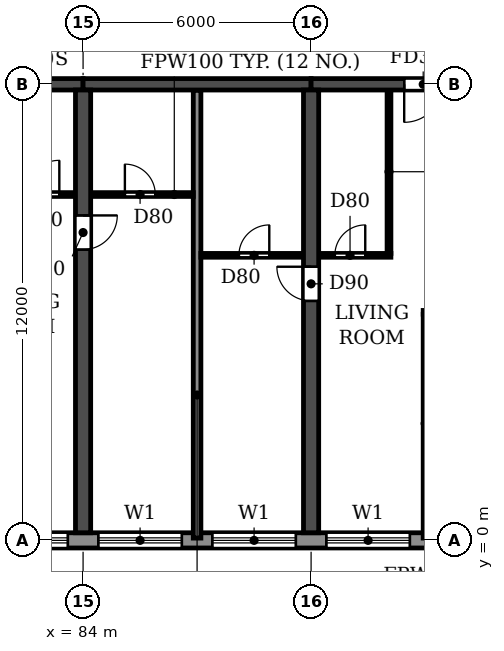
"""IFC4 building model, lengths in metres.
Left out: names, types, materials, properties, quantities, classifications, styles, units other than length and angle.
Written with IfcOpenShell. Run it as: python <this file> out.ifc"""

import sys

from ifc_helpers import new_model, si_unit, direction, frame, frame_2d, origin, place, context, subcontext, project, spatial, rectangle, extrude, element, fill, save


model = new_model("IFC4")
c1 = context("Model", 3, precision=1e-05, world=origin(), true_north=direction((0.0, 1.0)))
c2 = subcontext(c1, "Body", "Model", "MODEL_VIEW")
j1 = project(units=[si_unit("LENGTHUNIT", "METRE"), si_unit("PLANEANGLEUNIT", "RADIAN")], contexts=[c1])
p1 = place(None, origin())
s1 = spatial("IfcSite", under=j1, at=p1, CompositionType="ELEMENT")
p2 = place(p1, origin())
s2 = spatial("IfcBuilding", under=s1, at=p2, CompositionType="ELEMENT")
p3 = place(p2, frame((0.0, 0.0, 26.7)))
s3 = spatial("IfcBuildingStorey", under=s2, at=p3, CompositionType="ELEMENT", Elevation=26.7)
p4 = place(p3, frame((84.0, 0.2, 0.0), z_axis=(0.0, 0.0, 1.0), x_axis=(0.0, 1.0, 0.0)))
e1 = element("IfcWall", 1, at=p4, inside=s3, PredefinedType="SHEAR", context=c2, shape_type="SweptSolid", body=[
    extrude(rectangle(XDim=11.65, YDim=0.4, at=frame_2d((5.825, 0.0))), origin(), (0.0, 0.0, 1.0), 3.05),
])
p5 = place(p4, frame((7.45, 0.0, 0.0)))
e2 = element("IfcOpeningElement", 2, at=p5, cuts=e1, PredefinedType="OPENING", context=c2, shape_type="SweptSolid", body=[
    extrude(rectangle(XDim=0.9, YDim=2.1, at=frame_2d((0.45, 1.05))), frame((0.0, 0.21, 0.0), z_axis=(0.0, -1.0, 0.0), x_axis=(1.0, 0.0, 0.0)), (0.0, 0.0, 1.0), 0.42),
])
p6 = place(p3, frame((90.0, 0.2, 0.0), z_axis=(0.0, 0.0, 1.0), x_axis=(0.0, 1.0, 0.0)))
e3 = element("IfcWall", 3, at=p6, inside=s3, PredefinedType="SHEAR", context=c2, shape_type="SweptSolid", body=[
    extrude(rectangle(XDim=11.65, YDim=0.4, at=frame_2d((5.825, 0.0))), origin(), (0.0, 0.0, 1.0), 3.05),
])
p7 = place(p6, frame((6.1, 0.0, 0.0)))
e4 = element("IfcOpeningElement", 4, at=p7, cuts=e3, PredefinedType="OPENING", context=c2, shape_type="SweptSolid", body=[
    extrude(rectangle(XDim=0.9, YDim=2.1, at=frame_2d((0.45, 1.05))), frame((0.0, 0.21, 0.0), z_axis=(0.0, -1.0, 0.0), x_axis=(1.0, 0.0, 0.0)), (0.0, 0.0, 1.0), 0.42),
])
p8 = place(p3, frame((78.0, 12.0, 0.0), z_axis=(0.0, 0.0, 1.0), x_axis=(1.0, 0.0, 0.0)))
e5 = element("IfcWall", 5, at=p8, inside=s3, PredefinedType="SHEAR", context=c2, shape_type="SweptSolid", body=[
    extrude(rectangle(XDim=6.0, YDim=0.3, at=frame_2d((3.0, 0.0))), origin(), (0.0, 0.0, 1.0), 2.45),
])
p9 = place(p8, frame((2.45, 0.0, 0.0)))
e6 = element("IfcOpeningElement", 6, at=p9, cuts=e5, PredefinedType="OPENING", context=c2, shape_type="SweptSolid", body=[
    extrude(rectangle(XDim=1.0, YDim=2.1, at=frame_2d((0.5, 1.05))), frame((0.0, 0.16, 0.0), z_axis=(0.0, -1.0, 0.0), x_axis=(1.0, 0.0, 0.0)), (0.0, 0.0, 1.0), 0.32),
])
p10 = place(p3, frame((84.0, 12.0, 0.0), z_axis=(0.0, 0.0, 1.0), x_axis=(1.0, 0.0, 0.0)))
e7 = element("IfcWall", 7, at=p10, inside=s3, PredefinedType="SHEAR", context=c2, shape_type="SweptSolid", body=[
    extrude(rectangle(XDim=6.0, YDim=0.3, at=frame_2d((3.0, 0.0))), origin(), (0.0, 0.0, 1.0), 2.45),
])
p11 = place(p3, frame((90.0, 12.0, 0.0), z_axis=(0.0, 0.0, 1.0), x_axis=(1.0, 0.0, 0.0)))
e8 = element("IfcWall", 8, at=p11, inside=s3, PredefinedType="SHEAR", context=c2, shape_type="SweptSolid", body=[
    extrude(rectangle(XDim=6.0, YDim=0.3, at=frame_2d((3.0, 0.0))), origin(), (0.0, 0.0, 1.0), 2.45),
])
p12 = place(p11, frame((2.45, 0.0, 0.0)))
e9 = element("IfcOpeningElement", 9, at=p12, cuts=e8, PredefinedType="OPENING", context=c2, shape_type="SweptSolid", body=[
    extrude(rectangle(XDim=1.0, YDim=2.1, at=frame_2d((0.5, 1.05))), frame((0.0, 0.16, 0.0), z_axis=(0.0, -1.0, 0.0), x_axis=(1.0, 0.0, 0.0)), (0.0, 0.0, 1.0), 0.32),
])
p13 = place(p3, frame((4.683, 0.0, 0.0), z_axis=(0.0, 0.0, 1.0), x_axis=(1.0, 0.0, 0.0)))
e10 = element("IfcWall", 10, at=p13, inside=s3, PredefinedType="STANDARD", context=c2, shape_type="SweptSolid", body=[
    extrude(rectangle(XDim=92.634, YDim=0.4, at=frame_2d((46.317, 0.0))), origin(), (0.0, 0.0, 1.0), 3.05),
])
p14 = place(p13, frame((1.717, 0.0, 0.9)))
e11 = element("IfcOpeningElement", 11, at=p14, cuts=e10, PredefinedType="OPENING", context=c2, shape_type="SweptSolid", body=[
    extrude(rectangle(XDim=2.2, YDim=1.5, at=frame_2d((1.1, 0.75))), frame((0.0, 0.21, 0.0), z_axis=(0.0, -1.0, 0.0), x_axis=(1.0, 0.0, 0.0)), (0.0, 0.0, 1.0), 0.42),
])
p15 = place(p13, frame((4.717, 0.0, 0.9)))
e12 = element("IfcOpeningElement", 12, at=p15, cuts=e10, PredefinedType="OPENING", context=c2, shape_type="SweptSolid", body=[
    extrude(rectangle(XDim=2.2, YDim=1.5, at=frame_2d((1.1, 0.75))), frame((0.0, 0.21, 0.0), z_axis=(0.0, -1.0, 0.0), x_axis=(1.0, 0.0, 0.0)), (0.0, 0.0, 1.0), 0.42),
])
p16 = place(p13, frame((7.717, 0.0, 0.9)))
e13 = element("IfcOpeningElement", 13, at=p16, cuts=e10, PredefinedType="OPENING", context=c2, shape_type="SweptSolid", body=[
    extrude(rectangle(XDim=2.2, YDim=1.5, at=frame_2d((1.1, 0.75))), frame((0.0, 0.21, 0.0), z_axis=(0.0, -1.0, 0.0), x_axis=(1.0, 0.0, 0.0)), (0.0, 0.0, 1.0), 0.42),
])
p17 = place(p13, frame((10.717, 0.0, 0.9)))
e14 = element("IfcOpeningElement", 14, at=p17, cuts=e10, PredefinedType="OPENING", context=c2, shape_type="SweptSolid", body=[
    extrude(rectangle(XDim=2.2, YDim=1.5, at=frame_2d((1.1, 0.75))), frame((0.0, 0.21, 0.0), z_axis=(0.0, -1.0, 0.0), x_axis=(1.0, 0.0, 0.0)), (0.0, 0.0, 1.0), 0.42),
])
p18 = place(p13, frame((13.717, 0.0, 0.9)))
e15 = element("IfcOpeningElement", 15, at=p18, cuts=e10, PredefinedType="OPENING", context=c2, shape_type="SweptSolid", body=[
    extrude(rectangle(XDim=2.2, YDim=1.5, at=frame_2d((1.1, 0.75))), frame((0.0, 0.21, 0.0), z_axis=(0.0, -1.0, 0.0), x_axis=(1.0, 0.0, 0.0)), (0.0, 0.0, 1.0), 0.42),
])
p19 = place(p13, frame((16.717, 0.0, 0.9)))
e16 = element("IfcOpeningElement", 16, at=p19, cuts=e10, PredefinedType="OPENING", context=c2, shape_type="SweptSolid", body=[
    extrude(rectangle(XDim=2.2, YDim=1.5, at=frame_2d((1.1, 0.75))), frame((0.0, 0.21, 0.0), z_axis=(0.0, -1.0, 0.0), x_axis=(1.0, 0.0, 0.0)), (0.0, 0.0, 1.0), 0.42),
])
p20 = place(p13, frame((19.917, 0.0, 0.0)))
e17 = element("IfcOpeningElement", 17, at=p20, cuts=e10, PredefinedType="OPENING", context=c2, shape_type="SweptSolid", body=[
    extrude(rectangle(XDim=1.8, YDim=2.4, at=frame_2d((0.9, 1.2))), frame((0.0, 0.21, 0.0), z_axis=(0.0, -1.0, 0.0), x_axis=(1.0, 0.0, 0.0)), (0.0, 0.0, 1.0), 0.42),
])
p21 = place(p13, frame((22.717, 0.0, 0.9)))
e18 = element("IfcOpeningElement", 18, at=p21, cuts=e10, PredefinedType="OPENING", context=c2, shape_type="SweptSolid", body=[
    extrude(rectangle(XDim=2.2, YDim=1.5, at=frame_2d((1.1, 0.75))), frame((0.0, 0.21, 0.0), z_axis=(0.0, -1.0, 0.0), x_axis=(1.0, 0.0, 0.0)), (0.0, 0.0, 1.0), 0.42),
])
p22 = place(p13, frame((25.717, 0.0, 0.9)))
e19 = element("IfcOpeningElement", 19, at=p22, cuts=e10, PredefinedType="OPENING", context=c2, shape_type="SweptSolid", body=[
    extrude(rectangle(XDim=2.2, YDim=1.5, at=frame_2d((1.1, 0.75))), frame((0.0, 0.21, 0.0), z_axis=(0.0, -1.0, 0.0), x_axis=(1.0, 0.0, 0.0)), (0.0, 0.0, 1.0), 0.42),
])
p23 = place(p13, frame((28.717, 0.0, 0.9)))
e20 = element("IfcOpeningElement", 20, at=p23, cuts=e10, PredefinedType="OPENING", context=c2, shape_type="SweptSolid", body=[
    extrude(rectangle(XDim=2.2, YDim=1.5, at=frame_2d((1.1, 0.75))), frame((0.0, 0.21, 0.0), z_axis=(0.0, -1.0, 0.0), x_axis=(1.0, 0.0, 0.0)), (0.0, 0.0, 1.0), 0.42),
])
p24 = place(p13, frame((31.917, 0.0, 0.0)))
e21 = element("IfcOpeningElement", 21, at=p24, cuts=e10, PredefinedType="OPENING", context=c2, shape_type="SweptSolid", body=[
    extrude(rectangle(XDim=1.8, YDim=2.4, at=frame_2d((0.9, 1.2))), frame((0.0, 0.21, 0.0), z_axis=(0.0, -1.0, 0.0), x_axis=(1.0, 0.0, 0.0)), (0.0, 0.0, 1.0), 0.42),
])
p25 = place(p13, frame((34.717, 0.0, 0.9)))
e22 = element("IfcOpeningElement", 22, at=p25, cuts=e10, PredefinedType="OPENING", context=c2, shape_type="SweptSolid", body=[
    extrude(rectangle(XDim=2.2, YDim=1.5, at=frame_2d((1.1, 0.75))), frame((0.0, 0.21, 0.0), z_axis=(0.0, -1.0, 0.0), x_axis=(1.0, 0.0, 0.0)), (0.0, 0.0, 1.0), 0.42),
])
p26 = place(p13, frame((37.717, 0.0, 0.9)))
e23 = element("IfcOpeningElement", 23, at=p26, cuts=e10, PredefinedType="OPENING", context=c2, shape_type="SweptSolid", body=[
    extrude(rectangle(XDim=2.2, YDim=1.5, at=frame_2d((1.1, 0.75))), frame((0.0, 0.21, 0.0), z_axis=(0.0, -1.0, 0.0), x_axis=(1.0, 0.0, 0.0)), (0.0, 0.0, 1.0), 0.42),
])
p27 = place(p13, frame((40.717, 0.0, 0.9)))
e24 = element("IfcOpeningElement", 24, at=p27, cuts=e10, PredefinedType="OPENING", context=c2, shape_type="SweptSolid", body=[
    extrude(rectangle(XDim=2.2, YDim=1.5, at=frame_2d((1.1, 0.75))), frame((0.0, 0.21, 0.0), z_axis=(0.0, -1.0, 0.0), x_axis=(1.0, 0.0, 0.0)), (0.0, 0.0, 1.0), 0.42),
])
p28 = place(p13, frame((43.917, 0.0, 0.0)))
e25 = element("IfcOpeningElement", 25, at=p28, cuts=e10, PredefinedType="OPENING", context=c2, shape_type="SweptSolid", body=[
    extrude(rectangle(XDim=1.8, YDim=2.4, at=frame_2d((0.9, 1.2))), frame((0.0, 0.21, 0.0), z_axis=(0.0, -1.0, 0.0), x_axis=(1.0, 0.0, 0.0)), (0.0, 0.0, 1.0), 0.42),
])
p29 = place(p13, frame((46.717, 0.0, 0.9)))
e26 = element("IfcOpeningElement", 26, at=p29, cuts=e10, PredefinedType="OPENING", context=c2, shape_type="SweptSolid", body=[
    extrude(rectangle(XDim=2.2, YDim=1.5, at=frame_2d((1.1, 0.75))), frame((0.0, 0.21, 0.0), z_axis=(0.0, -1.0, 0.0), x_axis=(1.0, 0.0, 0.0)), (0.0, 0.0, 1.0), 0.42),
])
p30 = place(p13, frame((49.717, 0.0, 0.9)))
e27 = element("IfcOpeningElement", 27, at=p30, cuts=e10, PredefinedType="OPENING", context=c2, shape_type="SweptSolid", body=[
    extrude(rectangle(XDim=2.2, YDim=1.5, at=frame_2d((1.1, 0.75))), frame((0.0, 0.21, 0.0), z_axis=(0.0, -1.0, 0.0), x_axis=(1.0, 0.0, 0.0)), (0.0, 0.0, 1.0), 0.42),
])
p31 = place(p13, frame((52.717, 0.0, 0.9)))
e28 = element("IfcOpeningElement", 28, at=p31, cuts=e10, PredefinedType="OPENING", context=c2, shape_type="SweptSolid", body=[
    extrude(rectangle(XDim=2.2, YDim=1.5, at=frame_2d((1.1, 0.75))), frame((0.0, 0.21, 0.0), z_axis=(0.0, -1.0, 0.0), x_axis=(1.0, 0.0, 0.0)), (0.0, 0.0, 1.0), 0.42),
])
p32 = place(p13, frame((55.717, 0.0, 0.9)))
e29 = element("IfcOpeningElement", 29, at=p32, cuts=e10, PredefinedType="OPENING", context=c2, shape_type="SweptSolid", body=[
    extrude(rectangle(XDim=2.2, YDim=1.5, at=frame_2d((1.1, 0.75))), frame((0.0, 0.21, 0.0), z_axis=(0.0, -1.0, 0.0), x_axis=(1.0, 0.0, 0.0)), (0.0, 0.0, 1.0), 0.42),
])
p33 = place(p13, frame((58.917, 0.0, 0.0)))
e30 = element("IfcOpeningElement", 30, at=p33, cuts=e10, PredefinedType="OPENING", context=c2, shape_type="SweptSolid", body=[
    extrude(rectangle(XDim=1.8, YDim=2.4, at=frame_2d((0.9, 1.2))), frame((0.0, 0.21, 0.0), z_axis=(0.0, -1.0, 0.0), x_axis=(1.0, 0.0, 0.0)), (0.0, 0.0, 1.0), 0.42),
])
p34 = place(p13, frame((61.717, 0.0, 0.9)))
e31 = element("IfcOpeningElement", 31, at=p34, cuts=e10, PredefinedType="OPENING", context=c2, shape_type="SweptSolid", body=[
    extrude(rectangle(XDim=2.2, YDim=1.5, at=frame_2d((1.1, 0.75))), frame((0.0, 0.21, 0.0), z_axis=(0.0, -1.0, 0.0), x_axis=(1.0, 0.0, 0.0)), (0.0, 0.0, 1.0), 0.42),
])
p35 = place(p13, frame((64.717, 0.0, 0.9)))
e32 = element("IfcOpeningElement", 32, at=p35, cuts=e10, PredefinedType="OPENING", context=c2, shape_type="SweptSolid", body=[
    extrude(rectangle(XDim=2.2, YDim=1.5, at=frame_2d((1.1, 0.75))), frame((0.0, 0.21, 0.0), z_axis=(0.0, -1.0, 0.0), x_axis=(1.0, 0.0, 0.0)), (0.0, 0.0, 1.0), 0.42),
])
p36 = place(p13, frame((67.717, 0.0, 0.9)))
e33 = element("IfcOpeningElement", 33, at=p36, cuts=e10, PredefinedType="OPENING", context=c2, shape_type="SweptSolid", body=[
    extrude(rectangle(XDim=2.2, YDim=1.5, at=frame_2d((1.1, 0.75))), frame((0.0, 0.21, 0.0), z_axis=(0.0, -1.0, 0.0), x_axis=(1.0, 0.0, 0.0)), (0.0, 0.0, 1.0), 0.42),
])
p37 = place(p13, frame((70.917, 0.0, 0.0)))
e34 = element("IfcOpeningElement", 34, at=p37, cuts=e10, PredefinedType="OPENING", context=c2, shape_type="SweptSolid", body=[
    extrude(rectangle(XDim=1.8, YDim=2.4, at=frame_2d((0.9, 1.2))), frame((0.0, 0.21, 0.0), z_axis=(0.0, -1.0, 0.0), x_axis=(1.0, 0.0, 0.0)), (0.0, 0.0, 1.0), 0.42),
])
p38 = place(p13, frame((73.717, 0.0, 0.9)))
e35 = element("IfcOpeningElement", 35, at=p38, cuts=e10, PredefinedType="OPENING", context=c2, shape_type="SweptSolid", body=[
    extrude(rectangle(XDim=2.2, YDim=1.5, at=frame_2d((1.1, 0.75))), frame((0.0, 0.21, 0.0), z_axis=(0.0, -1.0, 0.0), x_axis=(1.0, 0.0, 0.0)), (0.0, 0.0, 1.0), 0.42),
])
p39 = place(p13, frame((76.717, 0.0, 0.9)))
e36 = element("IfcOpeningElement", 36, at=p39, cuts=e10, PredefinedType="OPENING", context=c2, shape_type="SweptSolid", body=[
    extrude(rectangle(XDim=2.2, YDim=1.5, at=frame_2d((1.1, 0.75))), frame((0.0, 0.21, 0.0), z_axis=(0.0, -1.0, 0.0), x_axis=(1.0, 0.0, 0.0)), (0.0, 0.0, 1.0), 0.42),
])
p40 = place(p13, frame((79.717, 0.0, 0.9)))
e37 = element("IfcOpeningElement", 37, at=p40, cuts=e10, PredefinedType="OPENING", context=c2, shape_type="SweptSolid", body=[
    extrude(rectangle(XDim=2.2, YDim=1.5, at=frame_2d((1.1, 0.75))), frame((0.0, 0.21, 0.0), z_axis=(0.0, -1.0, 0.0), x_axis=(1.0, 0.0, 0.0)), (0.0, 0.0, 1.0), 0.42),
])
p41 = place(p13, frame((82.717, 0.0, 0.9)))
e38 = element("IfcOpeningElement", 38, at=p41, cuts=e10, PredefinedType="OPENING", context=c2, shape_type="SweptSolid", body=[
    extrude(rectangle(XDim=2.2, YDim=1.5, at=frame_2d((1.1, 0.75))), frame((0.0, 0.21, 0.0), z_axis=(0.0, -1.0, 0.0), x_axis=(1.0, 0.0, 0.0)), (0.0, 0.0, 1.0), 0.42),
])
p42 = place(p13, frame((85.717, 0.0, 0.9)))
e39 = element("IfcOpeningElement", 39, at=p42, cuts=e10, PredefinedType="OPENING", context=c2, shape_type="SweptSolid", body=[
    extrude(rectangle(XDim=2.2, YDim=1.5, at=frame_2d((1.1, 0.75))), frame((0.0, 0.21, 0.0), z_axis=(0.0, -1.0, 0.0), x_axis=(1.0, 0.0, 0.0)), (0.0, 0.0, 1.0), 0.42),
])
p43 = place(p13, frame((88.717, 0.0, 0.9)))
e40 = element("IfcOpeningElement", 40, at=p43, cuts=e10, PredefinedType="OPENING", context=c2, shape_type="SweptSolid", body=[
    extrude(rectangle(XDim=2.2, YDim=1.5, at=frame_2d((1.1, 0.75))), frame((0.0, 0.21, 0.0), z_axis=(0.0, -1.0, 0.0), x_axis=(1.0, 0.0, 0.0)), (0.0, 0.0, 1.0), 0.42),
])
p44 = place(p3, frame((87.0, 0.06, 0.0), z_axis=(0.0, 0.0, 1.0), x_axis=(0.0, 1.0, 0.0)))
e41 = element("IfcWall", 41, at=p44, inside=s3, PredefinedType="PARTITIONING", context=c2, shape_type="SweptSolid", body=[
    extrude(rectangle(XDim=11.78, YDim=0.2, at=frame_2d((5.89, 0.0))), origin(), (0.0, 0.0, 1.0), 3.05),
])
p45 = place(p3, frame((92.95, 6.0, 0.0), z_axis=(0.0, 0.0, 1.0), x_axis=(1.0, 0.0, 0.0)))
e42 = element("IfcWall", 42, at=p45, inside=s3, PredefinedType="PARTITIONING", context=c2, shape_type="SweptSolid", body=[
    extrude(rectangle(XDim=2.84, YDim=0.1, at=frame_2d((1.42, 0.0))), origin(), (0.0, 0.0, 1.0), 3.05),
])
p46 = place(p45, frame((0.55, 0.0, 0.0)))
e43 = element("IfcOpeningElement", 43, at=p46, cuts=e42, PredefinedType="OPENING", context=c2, shape_type="SweptSolid", body=[
    extrude(rectangle(XDim=0.9, YDim=2.1, at=frame_2d((0.45, 1.05))), frame((0.0, 0.06, 0.0), z_axis=(0.0, -1.0, 0.0), x_axis=(1.0, 0.0, 0.0)), (0.0, 0.0, 1.0), 0.12),
])
p47 = place(p3, frame((87.1, 7.5, 0.0), z_axis=(0.0, 0.0, 1.0), x_axis=(1.0, 0.0, 0.0)))
e44 = element("IfcWall", 44, at=p47, inside=s3, PredefinedType="PARTITIONING", context=c2, shape_type="SweptSolid", body=[
    extrude(rectangle(XDim=2.69, YDim=0.1, at=frame_2d((1.345, 0.0))), origin(), (0.0, 0.0, 1.0), 3.05),
])
p48 = place(p47, frame((1.0, 0.0, 0.0)))
e45 = element("IfcOpeningElement", 45, at=p48, cuts=e44, PredefinedType="OPENING", context=c2, shape_type="SweptSolid", body=[
    extrude(rectangle(XDim=0.8, YDim=2.1, at=frame_2d((0.4, 1.05))), frame((0.0, 0.06, 0.0), z_axis=(0.0, -1.0, 0.0), x_axis=(1.0, 0.0, 0.0)), (0.0, 0.0, 1.0), 0.12),
])
p49 = place(p3, frame((90.21, 7.5, 0.0), z_axis=(0.0, 0.0, 1.0), x_axis=(1.0, 0.0, 0.0)))
e46 = element("IfcWall", 46, at=p49, inside=s3, PredefinedType="PARTITIONING", context=c2, shape_type="SweptSolid", body=[
    extrude(rectangle(XDim=1.89, YDim=0.1, at=frame_2d((0.945, 0.0))), origin(), (0.0, 0.0, 1.0), 3.05),
])
p50 = place(p49, frame((0.415, 0.0, 0.0)))
e47 = element("IfcOpeningElement", 47, at=p50, cuts=e46, PredefinedType="OPENING", context=c2, shape_type="SweptSolid", body=[
    extrude(rectangle(XDim=0.8, YDim=2.1, at=frame_2d((0.4, 1.05))), frame((0.0, 0.06, 0.0), z_axis=(0.0, -1.0, 0.0), x_axis=(1.0, 0.0, 0.0)), (0.0, 0.0, 1.0), 0.12),
])
p51 = place(p3, frame((81.8, 9.1, 0.0), z_axis=(0.0, 0.0, 1.0), x_axis=(1.0, 0.0, 0.0)))
e48 = element("IfcWall", 48, at=p51, inside=s3, PredefinedType="PARTITIONING", context=c2, shape_type="SweptSolid", body=[
    extrude(rectangle(XDim=1.99, YDim=0.1, at=frame_2d((0.995, 0.0))), origin(), (0.0, 0.0, 1.0), 3.05),
])
p52 = place(p51, frame((0.675, 0.0, 0.0)))
e49 = element("IfcOpeningElement", 49, at=p52, cuts=e48, PredefinedType="OPENING", context=c2, shape_type="SweptSolid", body=[
    extrude(rectangle(XDim=0.9, YDim=2.1, at=frame_2d((0.45, 1.05))), frame((0.0, 0.06, 0.0), z_axis=(0.0, -1.0, 0.0), x_axis=(1.0, 0.0, 0.0)), (0.0, 0.0, 1.0), 0.12),
])
p53 = place(p3, frame((84.21, 9.1, 0.0), z_axis=(0.0, 0.0, 1.0), x_axis=(1.0, 0.0, 0.0)))
e50 = element("IfcWall", 50, at=p53, inside=s3, PredefinedType="PARTITIONING", context=c2, shape_type="SweptSolid", body=[
    extrude(rectangle(XDim=2.69, YDim=0.1, at=frame_2d((1.345, 0.0))), origin(), (0.0, 0.0, 1.0), 3.05),
])
p54 = place(p53, frame((0.89, 0.0, 0.0)))
e51 = element("IfcOpeningElement", 51, at=p54, cuts=e50, PredefinedType="OPENING", context=c2, shape_type="SweptSolid", body=[
    extrude(rectangle(XDim=0.8, YDim=2.1, at=frame_2d((0.4, 1.05))), frame((0.0, 0.06, 0.0), z_axis=(0.0, -1.0, 0.0), x_axis=(1.0, 0.0, 0.0)), (0.0, 0.0, 1.0), 0.12),
])
p55 = place(p3, frame((92.05, 7.55, 0.0), z_axis=(0.0, 0.0, 1.0), x_axis=(0.0, 1.0, 0.0)))
e52 = element("IfcWall", 52, at=p55, inside=s3, PredefinedType="PARTITIONING", context=c2, shape_type="SweptSolid", body=[
    extrude(rectangle(XDim=4.29, YDim=0.1, at=frame_2d((2.145, 0.0))), origin(), (0.0, 0.0, 1.0), 3.05),
])
p56 = place(p3, frame((93.0, 0.06, 0.0), z_axis=(0.0, 0.0, 1.0), x_axis=(0.0, 1.0, 0.0)))
e53 = element("IfcWall", 53, at=p56, inside=s3, PredefinedType="PARTITIONING", context=c2, shape_type="SweptSolid", body=[
    extrude(rectangle(XDim=5.89, YDim=0.1, at=frame_2d((2.945, 0.0))), origin(), (0.0, 0.0, 1.0), 3.05),
])
p57 = place(p39, origin())
e54 = element("IfcWindow", 54, at=p57, inside=s3, PartitioningType="DOUBLE_PANEL_HORIZONTAL", PredefinedType="WINDOW", context=c2, shape_type="SweptSolid", body=[
    extrude(rectangle(XDim=2.2, YDim=1.5, at=frame_2d((1.1, 0.75))), frame((0.0, 0.03, 0.0), z_axis=(0.0, -1.0, 0.0), x_axis=(1.0, 0.0, 0.0)), (0.0, 0.0, 1.0), 0.06),
])
fill(e36, e54)
p58 = place(p40, origin())
e55 = element("IfcWindow", 55, at=p58, inside=s3, PartitioningType="DOUBLE_PANEL_HORIZONTAL", PredefinedType="WINDOW", context=c2, shape_type="SweptSolid", body=[
    extrude(rectangle(XDim=2.2, YDim=1.5, at=frame_2d((1.1, 0.75))), frame((0.0, 0.03, 0.0), z_axis=(0.0, -1.0, 0.0), x_axis=(1.0, 0.0, 0.0)), (0.0, 0.0, 1.0), 0.06),
])
fill(e37, e55)
p59 = place(p41, origin())
e56 = element("IfcWindow", 56, at=p59, inside=s3, PartitioningType="DOUBLE_PANEL_HORIZONTAL", PredefinedType="WINDOW", context=c2, shape_type="SweptSolid", body=[
    extrude(rectangle(XDim=2.2, YDim=1.5, at=frame_2d((1.1, 0.75))), frame((0.0, 0.03, 0.0), z_axis=(0.0, -1.0, 0.0), x_axis=(1.0, 0.0, 0.0)), (0.0, 0.0, 1.0), 0.06),
])
fill(e38, e56)
p60 = place(p42, origin())
e57 = element("IfcWindow", 57, at=p60, inside=s3, PartitioningType="DOUBLE_PANEL_HORIZONTAL", PredefinedType="WINDOW", context=c2, shape_type="SweptSolid", body=[
    extrude(rectangle(XDim=2.2, YDim=1.5, at=frame_2d((1.1, 0.75))), frame((0.0, 0.03, 0.0), z_axis=(0.0, -1.0, 0.0), x_axis=(1.0, 0.0, 0.0)), (0.0, 0.0, 1.0), 0.06),
])
fill(e39, e57)
p61 = place(p54, origin())
e58 = element("IfcDoor", 58, at=p61, inside=s3, OperationType="SINGLE_SWING_LEFT", PredefinedType="DOOR", context=c2, shape_type="SweptSolid", body=[
    extrude(rectangle(XDim=0.8, YDim=2.1, at=frame_2d((0.4, 1.05))), frame((0.0, 0.025, 0.0), z_axis=(0.0, -1.0, 0.0), x_axis=(1.0, 0.0, 0.0)), (0.0, 0.0, 1.0), 0.05),
])
fill(e51, e58)
p62 = place(p52, origin())
e59 = element("IfcDoor", 59, at=p62, inside=s3, OperationType="SINGLE_SWING_RIGHT", PredefinedType="DOOR", context=c2, shape_type="SweptSolid", body=[
    extrude(rectangle(XDim=0.9, YDim=2.1, at=frame_2d((0.45, 1.05))), frame((0.0, 0.025, 0.0), z_axis=(0.0, -1.0, 0.0), x_axis=(1.0, 0.0, 0.0)), (0.0, 0.0, 1.0), 0.05),
])
fill(e49, e59)
p63 = place(p5, frame((0.9, 0.0, 0.0), z_axis=(0.0, 0.0, 1.0), x_axis=(-1.0, 0.0, 0.0)))
e60 = element("IfcDoor", 60, at=p63, inside=s3, OperationType="SINGLE_SWING_LEFT", PredefinedType="DOOR", context=c2, shape_type="SweptSolid", body=[
    extrude(rectangle(XDim=0.9, YDim=2.1, at=frame_2d((0.45, 1.05))), frame((0.0, 0.025, 0.0), z_axis=(0.0, -1.0, 0.0), x_axis=(1.0, 0.0, 0.0)), (0.0, 0.0, 1.0), 0.05),
])
fill(e2, e60)
p64 = place(p48, origin())
e61 = element("IfcDoor", 61, at=p64, inside=s3, OperationType="SINGLE_SWING_RIGHT", PredefinedType="DOOR", context=c2, shape_type="SweptSolid", body=[
    extrude(rectangle(XDim=0.8, YDim=2.1, at=frame_2d((0.4, 1.05))), frame((0.0, 0.025, 0.0), z_axis=(0.0, -1.0, 0.0), x_axis=(1.0, 0.0, 0.0)), (0.0, 0.0, 1.0), 0.05),
])
fill(e45, e61)
p65 = place(p7, origin())
e62 = element("IfcDoor", 62, at=p65, inside=s3, OperationType="SINGLE_SWING_RIGHT", PredefinedType="DOOR", context=c2, shape_type="SweptSolid", body=[
    extrude(rectangle(XDim=0.9, YDim=2.1, at=frame_2d((0.45, 1.05))), frame((0.0, 0.025, 0.0), z_axis=(0.0, -1.0, 0.0), x_axis=(1.0, 0.0, 0.0)), (0.0, 0.0, 1.0), 0.05),
])
fill(e4, e62)
p66 = place(p50, origin())
e63 = element("IfcDoor", 63, at=p66, inside=s3, OperationType="SINGLE_SWING_RIGHT", PredefinedType="DOOR", context=c2, shape_type="SweptSolid", body=[
    extrude(rectangle(XDim=0.8, YDim=2.1, at=frame_2d((0.4, 1.05))), frame((0.0, 0.025, 0.0), z_axis=(0.0, -1.0, 0.0), x_axis=(1.0, 0.0, 0.0)), (0.0, 0.0, 1.0), 0.05),
])
fill(e47, e63)
p67 = place(p12, frame((1.0, 0.0, 0.0), z_axis=(0.0, 0.0, 1.0), x_axis=(-1.0, 0.0, 0.0)))
e64 = element("IfcDoor", 64, at=p67, inside=s3, OperationType="SINGLE_SWING_RIGHT", PredefinedType="DOOR", context=c2, shape_type="SweptSolid", body=[
    extrude(rectangle(XDim=1.0, YDim=2.1, at=frame_2d((0.5, 1.05))), frame((0.0, 0.025, 0.0), z_axis=(0.0, -1.0, 0.0), x_axis=(1.0, 0.0, 0.0)), (0.0, 0.0, 1.0), 0.05),
])
fill(e9, e64)
save(model, sys.argv[1])
